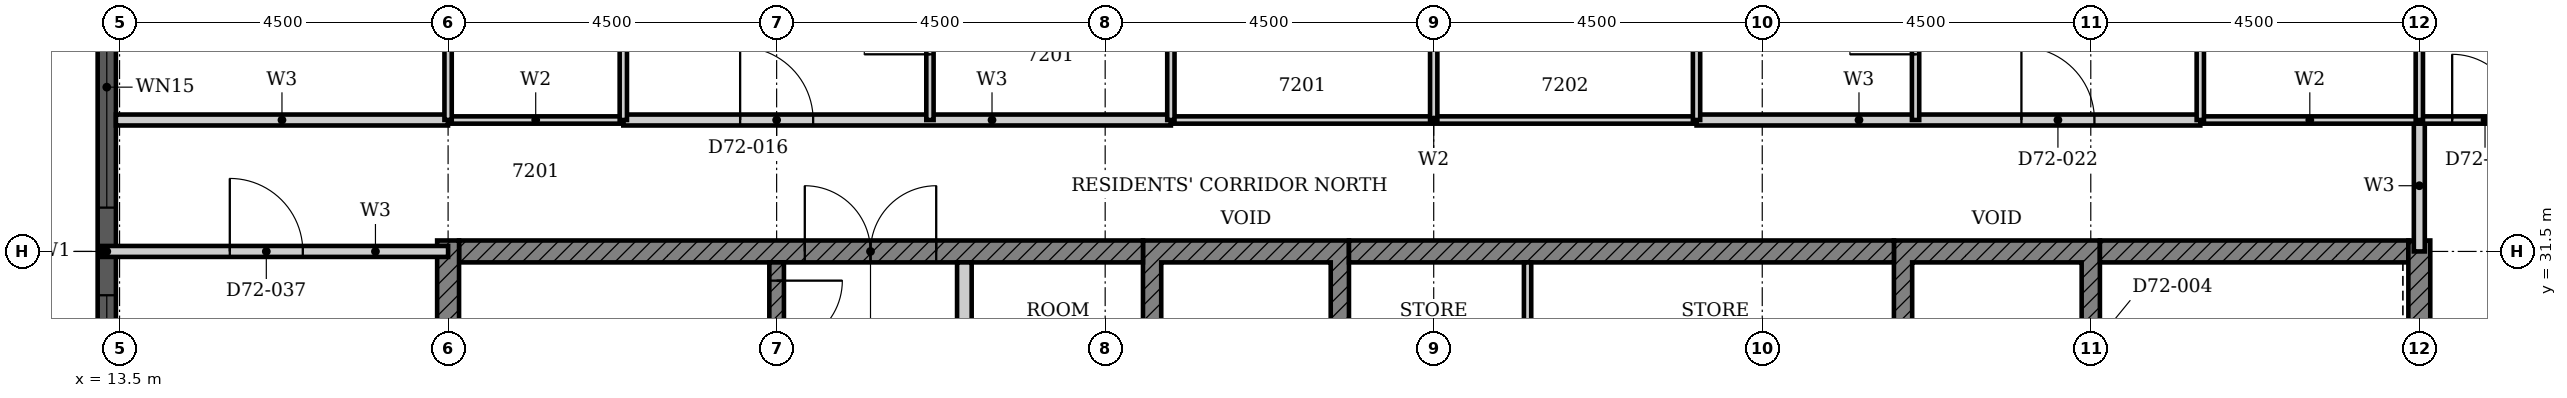
"""IFC4 building model, lengths in metres.
Left out: names, types, materials, properties, quantities, classifications, styles, units other than length and angle.
Written with IfcOpenShell. Run it as: python <this file> out.ifc"""

import sys

from ifc_helpers import new_model, si_unit, direction, frame, frame_2d, origin, place, context, subcontext, project, spatial, polyline, rectangle, outline, extrude, element, fill, save


model = new_model("IFC4")
c1 = context("Model", 3, precision=1e-05, world=origin(), true_north=direction((0.0, 1.0)))
c2 = subcontext(c1, "Body", "Model", "MODEL_VIEW")
j1 = project(units=[si_unit("LENGTHUNIT", "METRE"), si_unit("PLANEANGLEUNIT", "RADIAN")], contexts=[c1])
p1 = place(None, origin())
s1 = spatial("IfcSite", under=j1, at=p1, CompositionType="ELEMENT")
p2 = place(p1, origin())
s2 = spatial("IfcBuilding", under=s1, at=p2, CompositionType="ELEMENT")
p3 = place(p2, frame((0.0, 0.0, 283.4)))
s3 = spatial("IfcBuildingStorey", under=s2, at=p3, CompositionType="ELEMENT", Elevation=283.4)
p4 = place(p3, frame((13.325, 35.7, 0.0), z_axis=(0.0, 0.0, 1.0), x_axis=(0.0, -1.0, 0.0)))
e1 = element("IfcWall", 1, at=p4, inside=s3, PredefinedType="SOLIDWALL", context=c2, shape_type="SweptSolid", body=[
    extrude(rectangle(XDim=8.4, YDim=0.25, at=frame_2d((4.2, 0.0))), origin(), (0.0, 0.0, 1.0), 3.7),
])
p5 = place(p4, frame((0.3, 0.0, 0.45)))
e2 = element("IfcOpeningElement", 2, at=p5, cuts=e1, PredefinedType="OPENING", context=c2, shape_type="SweptSolid", body=[
    extrude(rectangle(XDim=3.3, YDim=2.3, at=frame_2d((1.65, 1.15))), frame((0.0, 0.135, 0.0), z_axis=(0.0, -1.0, 0.0), x_axis=(1.0, 0.0, 0.0)), (0.0, 0.0, 1.0), 0.27),
])
p6 = place(p4, frame((4.8, 0.0, 0.45)))
e3 = element("IfcOpeningElement", 3, at=p6, cuts=e1, PredefinedType="OPENING", context=c2, shape_type="SweptSolid", body=[
    extrude(rectangle(XDim=3.3, YDim=2.3, at=frame_2d((1.65, 1.15))), frame((0.0, 0.135, 0.0), z_axis=(0.0, -1.0, 0.0), x_axis=(1.0, 0.0, 0.0)), (0.0, 0.0, 1.0), 0.27),
])
p7 = place(p3, origin())
e4 = element("IfcWall", 4, at=p7, inside=s3, PredefinedType="SHEAR", context=c2, shape_type="SweptSolid", body=[
    extrude(outline(polyline([(27.518, 28.725), (27.768, 28.725), (27.768, 31.35), (30.089, 31.35), (30.089, 28.725), (30.339, 28.725), (30.339, 31.65), (27.518, 31.65), (27.518, 28.725)])), origin(), (0.0, 0.0, 1.0), 3.4),
])
p8 = place(p3, origin())
e5 = element("IfcWall", 5, at=p8, inside=s3, PredefinedType="SHEAR", context=c2, shape_type="SweptSolid", body=[
    extrude(outline(polyline([(37.803, 28.725), (38.053, 28.725), (38.053, 31.35), (40.375, 31.35), (40.375, 28.725), (40.625, 28.725), (40.625, 31.65), (37.803, 31.65), (37.803, 28.725)])), origin(), (0.0, 0.0, 1.0), 3.4),
])
p9 = place(p3, frame((18.15, 31.5, 0.0), z_axis=(0.0, 0.0, 1.0), x_axis=(1.0, 0.0, 0.0)))
e6 = element("IfcWall", 6, at=p9, inside=s3, PredefinedType="SHEAR", context=c2, shape_type="SweptSolid", body=[
    extrude(rectangle(XDim=9.368, YDim=0.3, at=frame_2d((4.684, 0.0))), origin(), (0.0, 0.0, 1.0), 3.4),
])
p10 = place(p9, frame((4.736, 0.0, 0.0)))
e7 = element("IfcOpeningElement", 7, at=p10, cuts=e6, PredefinedType="OPENING", context=c2, shape_type="SweptSolid", body=[
    extrude(rectangle(XDim=1.8, YDim=2.1, at=frame_2d((0.9, 1.05))), frame((0.0, 0.16, 0.0), z_axis=(0.0, -1.0, 0.0), x_axis=(1.0, 0.0, 0.0)), (0.0, 0.0, 1.0), 0.32),
])
p11 = place(p3, frame((30.339, 31.5, 0.0), z_axis=(0.0, 0.0, 1.0), x_axis=(1.0, 0.0, 0.0)))
e8 = element("IfcWall", 8, at=p11, inside=s3, PredefinedType="SHEAR", context=c2, shape_type="SweptSolid", body=[
    extrude(rectangle(XDim=7.464, YDim=0.3, at=frame_2d((3.732, 0.0))), origin(), (0.0, 0.0, 1.0), 3.4),
])
p12 = place(p3, frame((40.625, 31.5, 0.0), z_axis=(0.0, 0.0, 1.0), x_axis=(1.0, 0.0, 0.0)))
e9 = element("IfcWall", 9, at=p12, inside=s3, PredefinedType="SHEAR", context=c2, shape_type="SweptSolid", body=[
    extrude(rectangle(XDim=4.225, YDim=0.3, at=frame_2d((2.113, 0.0))), origin(), (0.0, 0.0, 1.0), 3.4),
])
for number, where, z_axis, x_axis in (
    (10, (18.0, 22.35, 0.0), (0.0, 0.0, 1.0), (0.0, 1.0, 0.0)),
    (11, (45.0, 22.35, 0.0), (0.0, 0.0, 1.0), (0.0, 1.0, 0.0)),
):
    element("IfcWall", number, at=place(p3, frame(where, z_axis=z_axis, x_axis=x_axis)), inside=s3, PredefinedType="SHEAR", context=c2, shape_type="SweptSolid", body=[
        extrude(rectangle(XDim=9.3, YDim=0.3, at=frame_2d((4.65, 0.0))), origin(), (0.0, 0.0, 1.0), 3.4),
    ])
p13 = place(p3, frame((25.072, 28.725, 0.0), z_axis=(0.0, 0.0, 1.0), x_axis=(0.0, 1.0, 0.0)))
e12 = element("IfcWall", 12, at=p13, inside=s3, PredefinedType="PARTITIONING", context=c2, shape_type="SweptSolid", body=[
    extrude(rectangle(XDim=2.625, YDim=0.2, at=frame_2d((1.312, 0.0))), origin(), (0.0, 0.0, 1.0), 3.4),
])
p14 = place(p3, frame((32.786, 28.725, 0.0), z_axis=(0.0, 0.0, 1.0), x_axis=(0.0, 1.0, 0.0)))
e13 = element("IfcWall", 13, at=p14, inside=s3, PredefinedType="PARTITIONING", context=c2, shape_type="SweptSolid", body=[
    extrude(rectangle(XDim=2.625, YDim=0.1, at=frame_2d((1.312, 0.0))), origin(), (0.0, 0.0, 1.0), 3.4),
])
p15 = place(p3, frame((22.5, 31.35, 0.0), z_axis=(0.0, 0.0, 1.0), x_axis=(0.0, -1.0, 0.0)))
e14 = element("IfcWall", 14, at=p15, inside=s3, PredefinedType="SHEAR", context=c2, shape_type="SweptSolid", body=[
    extrude(rectangle(XDim=5.825, YDim=0.2, at=frame_2d((2.913, 0.0))), origin(), (0.0, 0.0, 1.0), 3.4),
])
p16 = place(p15, frame((0.25, 0.0, 0.0)))
e15 = element("IfcOpeningElement", 15, at=p16, cuts=e14, PredefinedType="OPENING", context=c2, shape_type="SweptSolid", body=[
    extrude(rectangle(XDim=1.8, YDim=2.1, at=frame_2d((0.9, 1.05))), frame((0.0, 0.11, 0.0), z_axis=(0.0, -1.0, 0.0), x_axis=(1.0, 0.0, 0.0)), (0.0, 0.0, 1.0), 0.22),
])
p17 = place(p3, frame((13.26, 31.5, 0.0), z_axis=(0.0, 0.0, 1.0), x_axis=(1.0, 0.0, 0.0)))
e16 = element("IfcWall", 16, at=p17, inside=s3, PredefinedType="PARTITIONING", context=c2, shape_type="SweptSolid", body=[
    extrude(rectangle(XDim=4.74, YDim=0.15, at=frame_2d((2.37, 0.0))), origin(), (0.0, 0.0, 1.0), 3.4),
])
p18 = place(p17, frame((1.75, 0.0, 0.0)))
e17 = element("IfcOpeningElement", 17, at=p18, cuts=e16, PredefinedType="OPENING", context=c2, shape_type="SweptSolid", body=[
    extrude(rectangle(XDim=1.0, YDim=2.2, at=frame_2d((0.5, 1.1))), frame((0.0, 0.085, 0.0), z_axis=(0.0, -1.0, 0.0), x_axis=(1.0, 0.0, 0.0)), (0.0, 0.0, 1.0), 0.17),
])
p19 = place(p3, frame((13.45, 33.3, 0.0), z_axis=(0.0, 0.0, 1.0), x_axis=(1.0, 0.0, 0.0)))
e18 = element("IfcWall", 18, at=p19, inside=s3, PredefinedType="PARTITIONING", context=c2, shape_type="SweptSolid", body=[
    extrude(rectangle(XDim=4.549, YDim=0.15, at=frame_2d((2.274, 0.0))), origin(), (0.0, 0.0, 1.0), 3.4),
])
p20 = place(p3, frame((20.4, 33.3, 0.0), z_axis=(0.0, 0.0, 1.0), x_axis=(1.0, 0.0, 0.0)))
e19 = element("IfcWall", 19, at=p20, inside=s3, PredefinedType="PARTITIONING", context=c2, shape_type="SweptSolid", body=[
    extrude(rectangle(XDim=7.5, YDim=0.15, at=frame_2d((3.75, 0.0))), origin(), (0.0, 0.0, 1.0), 3.4),
])
p21 = place(p20, frame((1.6, 0.0, 0.0)))
e20 = element("IfcOpeningElement", 20, at=p21, cuts=e19, PredefinedType="OPENING", context=c2, shape_type="SweptSolid", body=[
    extrude(rectangle(XDim=1.0, YDim=2.2, at=frame_2d((0.5, 1.1))), frame((0.0, 0.085, 0.0), z_axis=(0.0, -1.0, 0.0), x_axis=(1.0, 0.0, 0.0)), (0.0, 0.0, 1.0), 0.17),
])
p22 = place(p3, frame((35.1, 33.3, 0.0), z_axis=(0.0, 0.0, 1.0), x_axis=(1.0, 0.0, 0.0)))
e21 = element("IfcWall", 21, at=p22, inside=s3, PredefinedType="PARTITIONING", context=c2, shape_type="SweptSolid", body=[
    extrude(rectangle(XDim=6.9, YDim=0.15, at=frame_2d((3.45, 0.0))), origin(), (0.0, 0.0, 1.0), 3.4),
])
p23 = place(p22, frame((4.45, 0.0, 0.0)))
e22 = element("IfcOpeningElement", 22, at=p23, cuts=e21, PredefinedType="OPENING", context=c2, shape_type="SweptSolid", body=[
    extrude(rectangle(XDim=1.0, YDim=2.2, at=frame_2d((0.5, 1.1))), frame((0.0, 0.085, 0.0), z_axis=(0.0, -1.0, 0.0), x_axis=(1.0, 0.0, 0.0)), (0.0, 0.0, 1.0), 0.17),
])
p24 = place(p3, frame((45.0, 31.5, 0.0), z_axis=(0.0, 0.0, 1.0), x_axis=(0.0, 1.0, 0.0)))
e23 = element("IfcWall", 23, at=p24, inside=s3, PredefinedType="PARTITIONING", context=c2, shape_type="SweptSolid", body=[
    extrude(rectangle(XDim=1.8, YDim=0.15, at=frame_2d((0.9, 0.0))), origin(), (0.0, 0.0, 1.0), 3.4),
])
p25 = place(p3, frame((45.0, 33.3, 0.0), z_axis=(0.0, 0.0, 1.0), x_axis=(1.0, 0.0, 0.0)))
e24 = element("IfcWall", 24, at=p25, inside=s3, PredefinedType="PARTITIONING", context=c2, shape_type="SweptSolid", body=[
    extrude(rectangle(XDim=1.8, YDim=0.1, at=frame_2d((0.9, 0.0))), origin(), (0.0, 0.0, 1.0), 3.4),
])
p26 = place(p25, frame((0.45, 0.0, 0.0)))
e25 = element("IfcOpeningElement", 25, at=p26, cuts=e24, PredefinedType="OPENING", context=c2, shape_type="SweptSolid", body=[
    extrude(rectangle(XDim=0.9, YDim=2.1, at=frame_2d((0.45, 1.05))), frame((0.0, 0.06, 0.0), z_axis=(0.0, -1.0, 0.0), x_axis=(1.0, 0.0, 0.0)), (0.0, 0.0, 1.0), 0.12),
])
p27 = place(p3, frame((24.6, 33.3, 0.0), z_axis=(0.0, 0.0, 1.0), x_axis=(0.0, 1.0, 0.0)))
e26 = element("IfcWall", 26, at=p27, inside=s3, PredefinedType="PARTITIONING", context=c2, shape_type="SweptSolid", body=[
    extrude(rectangle(XDim=2.7, YDim=0.1, at=frame_2d((1.35, 0.0))), origin(), (0.0, 0.0, 1.0), 3.4),
])
p28 = place(p27, frame((0.9, 0.0, 0.0)))
e27 = element("IfcOpeningElement", 27, at=p28, cuts=e26, PredefinedType="OPENING", context=c2, shape_type="SweptSolid", body=[
    extrude(rectangle(XDim=0.9, YDim=2.1, at=frame_2d((0.45, 1.05))), frame((0.0, 0.06, 0.0), z_axis=(0.0, -1.0, 0.0), x_axis=(1.0, 0.0, 0.0)), (0.0, 0.0, 1.0), 0.12),
])
p29 = place(p3, frame((38.1, 33.3, 0.0), z_axis=(0.0, 0.0, 1.0), x_axis=(0.0, 1.0, 0.0)))
e28 = element("IfcWall", 28, at=p29, inside=s3, PredefinedType="PARTITIONING", context=c2, shape_type="SweptSolid", body=[
    extrude(rectangle(XDim=2.7, YDim=0.1, at=frame_2d((1.35, 0.0))), origin(), (0.0, 0.0, 1.0), 3.4),
])
p30 = place(p29, frame((0.9, 0.0, 0.0)))
e29 = element("IfcOpeningElement", 29, at=p30, cuts=e28, PredefinedType="OPENING", context=c2, shape_type="SweptSolid", body=[
    extrude(rectangle(XDim=0.9, YDim=2.1, at=frame_2d((0.45, 1.05))), frame((0.0, 0.06, 0.0), z_axis=(0.0, -1.0, 0.0), x_axis=(1.0, 0.0, 0.0)), (0.0, 0.0, 1.0), 0.12),
])
p31 = place(p3, frame((18.0, 33.3, 0.0), z_axis=(0.0, 0.0, 1.0), x_axis=(1.0, 0.0, 0.0)))
e30 = element("IfcWall", 30, at=p31, inside=s3, PredefinedType="PARTITIONING", context=c2, shape_type="SweptSolid", body=[
    extrude(rectangle(XDim=2.4, YDim=0.1, at=frame_2d((1.2, 0.0))), origin(), (0.0, 0.0, 1.0), 3.4),
])
p32 = place(p3, frame((27.9, 33.3, 0.0), z_axis=(0.0, 0.0, 1.0), x_axis=(1.0, 0.0, 0.0)))
e31 = element("IfcWall", 31, at=p32, inside=s3, PredefinedType="PARTITIONING", context=c2, shape_type="SweptSolid", body=[
    extrude(rectangle(XDim=7.2, YDim=0.1, at=frame_2d((3.6, 0.0))), origin(), (0.0, 0.0, 1.0), 3.4),
])
p33 = place(p3, frame((42.0, 33.3, 0.0), z_axis=(0.0, 0.0, 1.0), x_axis=(1.0, 0.0, 0.0)))
e32 = element("IfcWall", 32, at=p33, inside=s3, PredefinedType="PARTITIONING", context=c2, shape_type="SweptSolid", body=[
    extrude(rectangle(XDim=3.0, YDim=0.1, at=frame_2d((1.5, 0.0))), origin(), (0.0, 0.0, 1.0), 3.4),
])
p34 = place(p3, frame((18.0, 33.301, 0.0), z_axis=(0.0, 0.0, 1.0), x_axis=(0.0, 1.0, 0.0)))
e33 = element("IfcWall", 33, at=p34, inside=s3, PredefinedType="PARTITIONING", context=c2, shape_type="SweptSolid", body=[
    extrude(rectangle(XDim=2.699, YDim=0.1, at=frame_2d((1.35, 0.0))), origin(), (0.0, 0.0, 1.0), 3.4),
])
p35 = place(p3, frame((20.4, 33.3, 0.0), z_axis=(0.0, 0.0, 1.0), x_axis=(0.0, 1.0, 0.0)))
e34 = element("IfcWall", 34, at=p35, inside=s3, PredefinedType="PARTITIONING", context=c2, shape_type="SweptSolid", body=[
    extrude(rectangle(XDim=2.7, YDim=0.1, at=frame_2d((1.35, 0.0))), origin(), (0.0, 0.0, 1.0), 3.4),
])
p36 = place(p35, frame((0.95, 0.0, 0.0)))
e35 = element("IfcOpeningElement", 35, at=p36, cuts=e34, PredefinedType="OPENING", context=c2, shape_type="SweptSolid", body=[
    extrude(rectangle(XDim=0.8, YDim=2.1, at=frame_2d((0.4, 1.05))), frame((0.0, 0.06, 0.0), z_axis=(0.0, -1.0, 0.0), x_axis=(1.0, 0.0, 0.0)), (0.0, 0.0, 1.0), 0.12),
])
for number, where, z_axis, x_axis in (
    (36, (27.9, 33.3, 0.0), (0.0, 0.0, 1.0), (0.0, 1.0, 0.0)),
    (37, (31.5, 33.3, 0.0), (0.0, 0.0, 1.0), (0.0, 1.0, 0.0)),
    (38, (35.1, 33.3, 0.0), (0.0, 0.0, 1.0), (0.0, 1.0, 0.0)),
):
    element("IfcWall", number, at=place(p3, frame(where, z_axis=z_axis, x_axis=x_axis)), inside=s3, PredefinedType="PARTITIONING", context=c2, shape_type="SweptSolid", body=[
        extrude(rectangle(XDim=2.7, YDim=0.1, at=frame_2d((1.35, 0.0))), origin(), (0.0, 0.0, 1.0), 3.4),
    ])
p37 = place(p3, frame((42.0, 33.3, 0.0), z_axis=(0.0, 0.0, 1.0), x_axis=(0.0, 1.0, 0.0)))
e39 = element("IfcWall", 39, at=p37, inside=s3, PredefinedType="PARTITIONING", context=c2, shape_type="SweptSolid", body=[
    extrude(rectangle(XDim=2.7, YDim=0.1, at=frame_2d((1.35, 0.0))), origin(), (0.0, 0.0, 1.0), 3.4),
])
p38 = place(p37, frame((0.95, 0.0, 0.0)))
e40 = element("IfcOpeningElement", 40, at=p38, cuts=e39, PredefinedType="OPENING", context=c2, shape_type="SweptSolid", body=[
    extrude(rectangle(XDim=0.8, YDim=2.1, at=frame_2d((0.4, 1.05))), frame((0.0, 0.06, 0.0), z_axis=(0.0, -1.0, 0.0), x_axis=(1.0, 0.0, 0.0)), (0.0, 0.0, 1.0), 0.12),
])
p39 = place(p3, frame((45.0, 33.3, 0.0), z_axis=(0.0, 0.0, 1.0), x_axis=(0.0, 1.0, 0.0)))
e41 = element("IfcWall", 41, at=p39, inside=s3, PredefinedType="PARTITIONING", context=c2, shape_type="SweptSolid", body=[
    extrude(rectangle(XDim=2.7, YDim=0.1, at=frame_2d((1.35, 0.0))), origin(), (0.0, 0.0, 1.0), 3.4),
])
p40 = place(p5, origin())
e42 = element("IfcWindow", 42, at=p40, inside=s3, PartitioningType="SINGLE_PANEL", PredefinedType="WINDOW", context=c2, shape_type="SweptSolid", body=[
    extrude(rectangle(XDim=3.3, YDim=2.3, at=frame_2d((1.65, 1.15))), frame((0.0, 0.03, 0.0), z_axis=(0.0, -1.0, 0.0), x_axis=(1.0, 0.0, 0.0)), (0.0, 0.0, 1.0), 0.06),
])
fill(e2, e42)
p41 = place(p6, origin())
e43 = element("IfcWindow", 43, at=p41, inside=s3, PartitioningType="SINGLE_PANEL", PredefinedType="WINDOW", context=c2, shape_type="SweptSolid", body=[
    extrude(rectangle(XDim=3.3, YDim=2.3, at=frame_2d((1.65, 1.15))), frame((0.0, 0.03, 0.0), z_axis=(0.0, -1.0, 0.0), x_axis=(1.0, 0.0, 0.0)), (0.0, 0.0, 1.0), 0.06),
])
fill(e3, e43)
p42 = place(p16, origin())
e44 = element("IfcDoor", 44, at=p42, inside=s3, OperationType="DOUBLE_DOOR_SINGLE_SWING", PredefinedType="DOOR", context=c2, shape_type="SweptSolid", body=[
    extrude(rectangle(XDim=1.8, YDim=2.1, at=frame_2d((0.9, 1.05))), frame((0.0, 0.025, 0.0), z_axis=(0.0, -1.0, 0.0), x_axis=(1.0, 0.0, 0.0)), (0.0, 0.0, 1.0), 0.05),
])
fill(e15, e44)
p43 = place(p10, origin())
e45 = element("IfcDoor", 45, at=p43, inside=s3, OperationType="DOUBLE_DOOR_SINGLE_SWING", PredefinedType="DOOR", context=c2, shape_type="SweptSolid", body=[
    extrude(rectangle(XDim=1.8, YDim=2.1, at=frame_2d((0.9, 1.05))), frame((0.0, 0.025, 0.0), z_axis=(0.0, -1.0, 0.0), x_axis=(1.0, 0.0, 0.0)), (0.0, 0.0, 1.0), 0.05),
])
fill(e7, e45)
p44 = place(p21, origin())
e46 = element("IfcDoor", 46, at=p44, inside=s3, OperationType="SINGLE_SWING_RIGHT", PredefinedType="DOOR", context=c2, shape_type="SweptSolid", body=[
    extrude(rectangle(XDim=1.0, YDim=2.2, at=frame_2d((0.5, 1.1))), frame((0.0, 0.025, 0.0), z_axis=(0.0, -1.0, 0.0), x_axis=(1.0, 0.0, 0.0)), (0.0, 0.0, 1.0), 0.05),
])
fill(e20, e46)
p45 = place(p28, origin())
e47 = element("IfcDoor", 47, at=p45, inside=s3, OperationType="SINGLE_SWING_LEFT", PredefinedType="DOOR", context=c2, shape_type="SweptSolid", body=[
    extrude(rectangle(XDim=0.9, YDim=2.1, at=frame_2d((0.45, 1.05))), frame((0.0, 0.025, 0.0), z_axis=(0.0, -1.0, 0.0), x_axis=(1.0, 0.0, 0.0)), (0.0, 0.0, 1.0), 0.05),
])
fill(e27, e47)
p46 = place(p23, origin())
e48 = element("IfcDoor", 48, at=p46, inside=s3, OperationType="SINGLE_SWING_LEFT", PredefinedType="DOOR", context=c2, shape_type="SweptSolid", body=[
    extrude(rectangle(XDim=1.0, YDim=2.2, at=frame_2d((0.5, 1.1))), frame((0.0, 0.025, 0.0), z_axis=(0.0, -1.0, 0.0), x_axis=(1.0, 0.0, 0.0)), (0.0, 0.0, 1.0), 0.05),
])
fill(e22, e48)
p47 = place(p30, origin())
e49 = element("IfcDoor", 49, at=p47, inside=s3, OperationType="SINGLE_SWING_LEFT", PredefinedType="DOOR", context=c2, shape_type="SweptSolid", body=[
    extrude(rectangle(XDim=0.9, YDim=2.1, at=frame_2d((0.45, 1.05))), frame((0.0, 0.025, 0.0), z_axis=(0.0, -1.0, 0.0), x_axis=(1.0, 0.0, 0.0)), (0.0, 0.0, 1.0), 0.05),
])
fill(e29, e49)
p48 = place(p18, origin())
e50 = element("IfcDoor", 50, at=p48, inside=s3, OperationType="SINGLE_SWING_LEFT", PredefinedType="DOOR", context=c2, shape_type="SweptSolid", body=[
    extrude(rectangle(XDim=1.0, YDim=2.2, at=frame_2d((0.5, 1.1))), frame((0.0, 0.025, 0.0), z_axis=(0.0, -1.0, 0.0), x_axis=(1.0, 0.0, 0.0)), (0.0, 0.0, 1.0), 0.05),
])
fill(e17, e50)
p49 = place(p26, origin())
e51 = element("IfcDoor", 51, at=p49, inside=s3, OperationType="SINGLE_SWING_LEFT", PredefinedType="DOOR", context=c2, shape_type="SweptSolid", body=[
    extrude(rectangle(XDim=0.9, YDim=2.1, at=frame_2d((0.45, 1.05))), frame((0.0, 0.025, 0.0), z_axis=(0.0, -1.0, 0.0), x_axis=(1.0, 0.0, 0.0)), (0.0, 0.0, 1.0), 0.05),
])
fill(e25, e51)
save(model, sys.argv[1])
